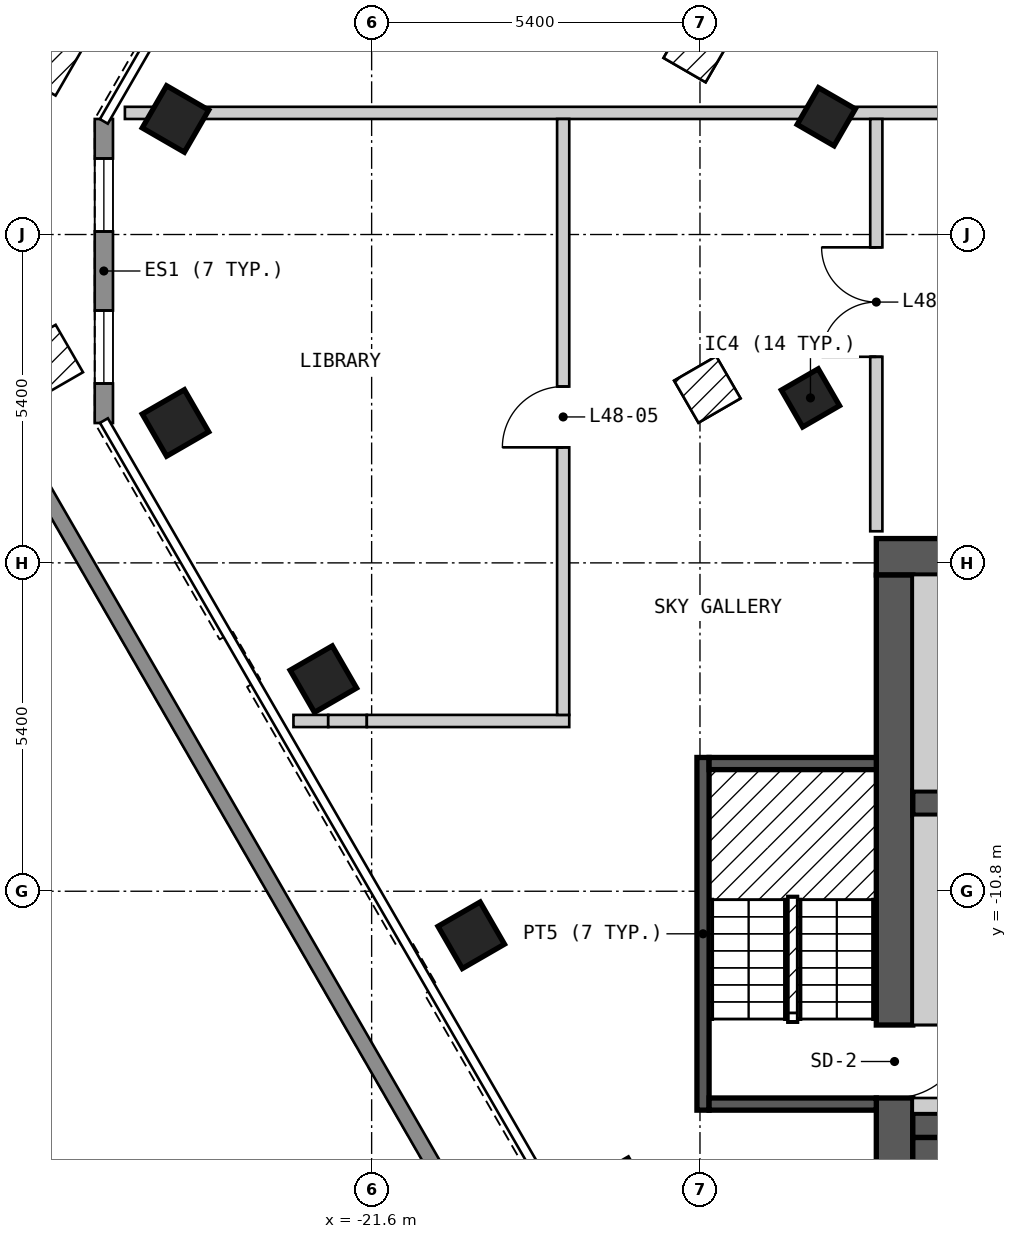
"""IFC4 building model, lengths in metres.
Left out: names, types, materials, properties, quantities, classifications, styles, units other than length and angle.
Written with IfcOpenShell. Run it as: python <this file> out.ifc"""

import sys

from ifc_helpers import new_model, si_unit, direction, frame, frame_2d, origin, origin_2d, place, context, subcontext, project, spatial, polyline, rectangle, outline, extrude, element, fill, save


model = new_model("IFC4")
c1 = context("Model", 3, precision=1e-05, world=origin(), true_north=direction((0.0, 1.0)))
c2 = subcontext(c1, "Body", "Model", "MODEL_VIEW")
j1 = project(units=[si_unit("LENGTHUNIT", "METRE"), si_unit("PLANEANGLEUNIT", "RADIAN")], contexts=[c1])
p1 = place(None, origin())
s1 = spatial("IfcSite", under=j1, at=p1, CompositionType="ELEMENT")
p2 = place(p1, origin())
s2 = spatial("IfcBuilding", under=s1, at=p2, CompositionType="ELEMENT")
p3 = place(p2, frame((0.0, 0.0, 157.2)))
s3 = spatial("IfcBuildingStorey", under=s2, at=p3, CompositionType="ELEMENT", Elevation=157.2)
for number, where, z_axis, x_axis in (
    (1, (-24.826, 1.9, 0.0), (0.0, 0.0, 1.0), (-0.5, -0.866, 0.0)),
    (2, (-24.826, -3.099, 0.0), (0.0, 0.0, 1.0), (0.5, -0.866, 0.0)),
    (3, (-22.394, -7.312, 0.0), (0.0, 0.0, 1.0), (0.5, -0.866, 0.0)),
    (4, (-19.962, -11.524, 0.0), (0.0, 0.0, 1.0), (0.5, -0.866, 0.0)),
    (5, (-17.53, -15.736, 0.0), (0.0, 0.0, 1.0), (0.5, -0.866, 0.0)),
):
    element("IfcColumn", number, at=place(p3, frame(where, z_axis=z_axis, x_axis=x_axis)), inside=s3, PredefinedType="COLUMN", context=c2, shape_type="SweptSolid", body=[
        extrude(rectangle(XDim=0.8, YDim=0.8, at=origin_2d()), origin(), (0.0, 0.0, 1.0), 6.0),
    ])
for number, where, z_axis, x_axis in (
    (6, (-14.383, -2.687, 0.0), (0.0, 0.0, 1.0), (0.5, -0.866, 0.0)),
    (7, (-14.123, 1.937, 0.0), (0.0, 0.0, 1.0), (-0.5, -0.866, 0.0)),
):
    element("IfcColumn", number, at=place(p3, frame(where, z_axis=z_axis, x_axis=x_axis)), inside=s3, PredefinedType="COLUMN", context=c2, shape_type="SweptSolid", body=[
        extrude(rectangle(XDim=0.7, YDim=0.7, at=origin_2d()), origin(), (0.0, 0.0, 1.0), 6.0),
    ])
p4 = place(p3, frame((-13.3, -5.3, 0.0), z_axis=(0.0, 0.0, 1.0), x_axis=(1.0, 0.0, 0.0)))
e8 = element("IfcWall", 8, at=p4, inside=s3, PredefinedType="SHEAR", context=c2, shape_type="SweptSolid", body=[
    extrude(rectangle(XDim=26.6, YDim=0.6, at=frame_2d((13.3, 0.0))), origin(), (0.0, 0.0, 1.0), 5.7),
])
p5 = place(p4, frame((23.65, 0.0, 0.0)))
e9 = element("IfcOpeningElement", 9, at=p5, cuts=e8, PredefinedType="OPENING", context=c2, shape_type="SweptSolid", body=[
    extrude(rectangle(XDim=1.2, YDim=2.1, at=frame_2d((0.6, 1.05))), frame((0.0, 0.31, 0.0), z_axis=(0.0, -1.0, 0.0), x_axis=(1.0, 0.0, 0.0)), (0.0, 0.0, 1.0), 0.62),
])
p6 = place(p3, frame((-13.0, -18.4, 0.0), z_axis=(0.0, 0.0, 1.0), x_axis=(0.0, 1.0, 0.0)))
e10 = element("IfcWall", 10, at=p6, inside=s3, PredefinedType="SHEAR", context=c2, shape_type="SweptSolid", body=[
    extrude(rectangle(XDim=12.8, YDim=0.6, at=frame_2d((6.4, 0.0))), origin(), (0.0, 0.0, 1.0), 5.7),
])
p7 = place(p6, frame((4.2, 0.0, 0.0)))
e11 = element("IfcOpeningElement", 11, at=p7, cuts=e10, PredefinedType="OPENING", context=c2, shape_type="SweptSolid", body=[
    extrude(rectangle(XDim=1.2, YDim=2.1, at=frame_2d((0.6, 1.05))), frame((0.0, 0.31, 0.0), z_axis=(0.0, -1.0, 0.0), x_axis=(1.0, 0.0, 0.0)), (0.0, 0.0, 1.0), 0.62),
])
p8 = place(p3, frame((-12.7, -14.65, 0.0), z_axis=(0.0, 0.0, 1.0), x_axis=(1.0, 0.0, 0.0)))
e12 = element("IfcWall", 12, at=p8, inside=s3, PredefinedType="SHEAR", context=c2, shape_type="SweptSolid", body=[
    extrude(rectangle(XDim=25.4, YDim=0.4, at=frame_2d((12.7, 0.0))), origin(), (0.0, 0.0, 1.0), 5.7),
])
p9 = place(p8, frame((1.9, 0.0, 0.0), z_axis=(0.0, 0.0, 1.0), x_axis=(-1.0, 0.0, 0.0)))
e13 = element("IfcOpeningElement", 13, at=p9, cuts=e12, PredefinedType="OPENING", context=c2, shape_type="SweptSolid", body=[
    extrude(rectangle(XDim=1.2, YDim=2.1, at=frame_2d((0.6, 1.05))), frame((0.0, 0.21, 0.0), z_axis=(0.0, -1.0, 0.0), x_axis=(1.0, 0.0, 0.0)), (0.0, 0.0, 1.0), 0.42),
])
p10 = place(p8, frame((24.75, 0.0, 0.0), z_axis=(0.0, 0.0, 1.0), x_axis=(-1.0, 0.0, 0.0)))
e14 = element("IfcOpeningElement", 14, at=p10, cuts=e12, PredefinedType="OPENING", context=c2, shape_type="SweptSolid", body=[
    extrude(rectangle(XDim=1.2, YDim=2.1, at=frame_2d((0.6, 1.05))), frame((0.0, 0.21, 0.0), z_axis=(0.0, -1.0, 0.0), x_axis=(1.0, 0.0, 0.0)), (0.0, 0.0, 1.0), 0.42),
])
p11 = place(p8, frame((8.6, 0.0, 0.0), z_axis=(0.0, 0.0, 1.0), x_axis=(-1.0, 0.0, 0.0)))
e15 = element("IfcOpeningElement", 15, at=p11, cuts=e12, PredefinedType="OPENING", context=c2, shape_type="SweptSolid", body=[
    extrude(rectangle(XDim=1.0, YDim=2.1, at=frame_2d((0.5, 1.05))), frame((0.0, 0.21, 0.0), z_axis=(0.0, -1.0, 0.0), x_axis=(1.0, 0.0, 0.0)), (0.0, 0.0, 1.0), 0.42),
])
p12 = place(p8, frame((11.35, 0.0, 0.0), z_axis=(0.0, 0.0, 1.0), x_axis=(-1.0, 0.0, 0.0)))
e16 = element("IfcOpeningElement", 16, at=p12, cuts=e12, PredefinedType="OPENING", context=c2, shape_type="SweptSolid", body=[
    extrude(rectangle(XDim=0.9, YDim=2.1, at=frame_2d((0.45, 1.05))), frame((0.0, 0.21, 0.0), z_axis=(0.0, -1.0, 0.0), x_axis=(1.0, 0.0, 0.0)), (0.0, 0.0, 1.0), 0.42),
])
p13 = place(p8, frame((14.15, 0.0, 0.0), z_axis=(0.0, 0.0, 1.0), x_axis=(-1.0, 0.0, 0.0)))
e17 = element("IfcOpeningElement", 17, at=p13, cuts=e12, PredefinedType="OPENING", context=c2, shape_type="SweptSolid", body=[
    extrude(rectangle(XDim=1.0, YDim=2.1, at=frame_2d((0.5, 1.05))), frame((0.0, 0.21, 0.0), z_axis=(0.0, -1.0, 0.0), x_axis=(1.0, 0.0, 0.0)), (0.0, 0.0, 1.0), 0.42),
])
p14 = place(p8, frame((17.75, 0.0, 0.0), z_axis=(0.0, 0.0, 1.0), x_axis=(-1.0, 0.0, 0.0)))
e18 = element("IfcOpeningElement", 18, at=p14, cuts=e12, PredefinedType="OPENING", context=c2, shape_type="SweptSolid", body=[
    extrude(rectangle(XDim=1.0, YDim=2.1, at=frame_2d((0.5, 1.05))), frame((0.0, 0.21, 0.0), z_axis=(0.0, -1.0, 0.0), x_axis=(1.0, 0.0, 0.0)), (0.0, 0.0, 1.0), 0.42),
])
p15 = place(p3, frame((-12.7, -9.35, 0.0), z_axis=(0.0, 0.0, 1.0), x_axis=(1.0, 0.0, 0.0)))
e19 = element("IfcWall", 19, at=p15, inside=s3, PredefinedType="SHEAR", context=c2, shape_type="SweptSolid", body=[
    extrude(rectangle(XDim=22.9, YDim=0.4, at=frame_2d((11.45, 0.0))), origin(), (0.0, 0.0, 1.0), 5.7),
])
p16 = place(p15, frame((1.3, 0.0, 0.0)))
e20 = element("IfcOpeningElement", 20, at=p16, cuts=e19, PredefinedType="OPENING", context=c2, shape_type="SweptSolid", body=[
    extrude(rectangle(XDim=1.1, YDim=2.1, at=frame_2d((0.55, 1.05))), frame((0.0, 0.21, 0.0), z_axis=(0.0, -1.0, 0.0), x_axis=(1.0, 0.0, 0.0)), (0.0, 0.0, 1.0), 0.42),
])
p17 = place(p15, frame((4.1, 0.0, 0.0)))
e21 = element("IfcOpeningElement", 21, at=p17, cuts=e19, PredefinedType="OPENING", context=c2, shape_type="SweptSolid", body=[
    extrude(rectangle(XDim=1.1, YDim=2.1, at=frame_2d((0.55, 1.05))), frame((0.0, 0.21, 0.0), z_axis=(0.0, -1.0, 0.0), x_axis=(1.0, 0.0, 0.0)), (0.0, 0.0, 1.0), 0.42),
])
p18 = place(p15, frame((6.9, 0.0, 0.0)))
e22 = element("IfcOpeningElement", 22, at=p18, cuts=e19, PredefinedType="OPENING", context=c2, shape_type="SweptSolid", body=[
    extrude(rectangle(XDim=1.1, YDim=2.1, at=frame_2d((0.55, 1.05))), frame((0.0, 0.21, 0.0), z_axis=(0.0, -1.0, 0.0), x_axis=(1.0, 0.0, 0.0)), (0.0, 0.0, 1.0), 0.42),
])
p19 = place(p15, frame((9.2, 0.0, 0.0)))
e23 = element("IfcOpeningElement", 23, at=p19, cuts=e19, PredefinedType="OPENING", context=c2, shape_type="SweptSolid", body=[
    extrude(rectangle(XDim=1.1, YDim=2.1, at=frame_2d((0.55, 1.05))), frame((0.0, 0.21, 0.0), z_axis=(0.0, -1.0, 0.0), x_axis=(1.0, 0.0, 0.0)), (0.0, 0.0, 1.0), 0.42),
])
p20 = place(p15, frame((11.5, 0.0, 0.0)))
e24 = element("IfcOpeningElement", 24, at=p20, cuts=e19, PredefinedType="OPENING", context=c2, shape_type="SweptSolid", body=[
    extrude(rectangle(XDim=1.1, YDim=2.1, at=frame_2d((0.55, 1.05))), frame((0.0, 0.21, 0.0), z_axis=(0.0, -1.0, 0.0), x_axis=(1.0, 0.0, 0.0)), (0.0, 0.0, 1.0), 0.42),
])
p21 = place(p15, frame((13.8, 0.0, 0.0)))
e25 = element("IfcOpeningElement", 25, at=p21, cuts=e19, PredefinedType="OPENING", context=c2, shape_type="SweptSolid", body=[
    extrude(rectangle(XDim=1.1, YDim=2.1, at=frame_2d((0.55, 1.05))), frame((0.0, 0.21, 0.0), z_axis=(0.0, -1.0, 0.0), x_axis=(1.0, 0.0, 0.0)), (0.0, 0.0, 1.0), 0.42),
])
p22 = place(p15, frame((16.1, 0.0, 0.0)))
e26 = element("IfcOpeningElement", 26, at=p22, cuts=e19, PredefinedType="OPENING", context=c2, shape_type="SweptSolid", body=[
    extrude(rectangle(XDim=1.1, YDim=2.1, at=frame_2d((0.55, 1.05))), frame((0.0, 0.21, 0.0), z_axis=(0.0, -1.0, 0.0), x_axis=(1.0, 0.0, 0.0)), (0.0, 0.0, 1.0), 0.42),
])
p23 = place(p15, frame((18.4, 0.0, 0.0)))
e27 = element("IfcOpeningElement", 27, at=p23, cuts=e19, PredefinedType="OPENING", context=c2, shape_type="SweptSolid", body=[
    extrude(rectangle(XDim=1.1, YDim=2.1, at=frame_2d((0.55, 1.05))), frame((0.0, 0.21, 0.0), z_axis=(0.0, -1.0, 0.0), x_axis=(1.0, 0.0, 0.0)), (0.0, 0.0, 1.0), 0.42),
])
p24 = place(p15, frame((20.8, 0.0, 0.0)))
e28 = element("IfcOpeningElement", 28, at=p24, cuts=e19, PredefinedType="OPENING", context=c2, shape_type="SweptSolid", body=[
    extrude(rectangle(XDim=1.1, YDim=2.1, at=frame_2d((0.55, 1.05))), frame((0.0, 0.21, 0.0), z_axis=(0.0, -1.0, 0.0), x_axis=(1.0, 0.0, 0.0)), (0.0, 0.0, 1.0), 0.42),
])
p25 = place(p3, frame((-26.004, 1.9, 0.0), z_axis=(0.0, 0.0, 1.0), x_axis=(0.0, -1.0, 0.0)))
e29 = element("IfcWall", 29, at=p25, inside=s3, PredefinedType="SOLIDWALL", context=c2, shape_type="SweptSolid", body=[
    extrude(outline(polyline([(0.0, -0.15), (5.0, -0.15), (4.92, 0.15), (0.08, 0.15), (0.0, -0.15)])), origin(), (0.0, 0.0, 1.0), 5.7),
])
p26 = place(p25, frame((0.65, 0.0, 0.15)))
e30 = element("IfcOpeningElement", 30, at=p26, cuts=e29, PredefinedType="OPENING", context=c2, shape_type="SweptSolid", body=[
    extrude(rectangle(XDim=1.2, YDim=2.1, at=frame_2d((0.6, 1.05))), frame((0.0, 0.16, 0.0), z_axis=(0.0, -1.0, 0.0), x_axis=(1.0, 0.0, 0.0)), (0.0, 0.0, 1.0), 0.32),
])
p27 = place(p25, frame((3.15, 0.0, 0.15)))
e31 = element("IfcOpeningElement", 31, at=p27, cuts=e29, PredefinedType="OPENING", context=c2, shape_type="SweptSolid", body=[
    extrude(rectangle(XDim=1.2, YDim=2.1, at=frame_2d((0.6, 1.05))), frame((0.0, 0.16, 0.0), z_axis=(0.0, -1.0, 0.0), x_axis=(1.0, 0.0, 0.0)), (0.0, 0.0, 1.0), 0.32),
])
p28 = place(p3, frame((-15.883, -23.437, 0.0), z_axis=(0.0, 0.0, 1.0), x_axis=(-0.500068533128, 0.865985832549, 0.0)))
e32 = element("IfcWall", 32, at=p28, inside=s3, PredefinedType="PARAPET", context=c2, shape_type="SweptSolid", body=[
    extrude(outline(polyline([(0.067, -0.125), (24.644, -0.125), (24.71, 0.125), (0.0, 0.125), (0.067, -0.125)])), origin(), (0.0, 0.0, 1.0), 1.6),
])
p29 = place(p3, frame((-28.24, 2.838, 0.0), z_axis=(0.0, 0.0, 1.0), x_axis=(0.500065532695, 0.865987565159, 0.0)))
e33 = element("IfcWall", 33, at=p29, inside=s3, PredefinedType="PARAPET", context=c2, shape_type="SweptSolid", body=[
    extrude(outline(polyline([(0.067, -0.125), (23.258, -0.125), (23.325, 0.125), (0.0, 0.125), (0.067, -0.125)])), origin(), (0.0, 0.0, 1.0), 1.6),
])
p30 = place(p3, frame((-22.886, -8.0, 0.0), z_axis=(0.0, 0.0, 1.0), x_axis=(1.0, 0.0, 0.0)))
e34 = element("IfcWall", 34, at=p30, inside=s3, PredefinedType="PARTITIONING", context=c2, shape_type="SweptSolid", body=[
    extrude(rectangle(XDim=0.572, YDim=0.2, at=frame_2d((0.286, 0.0))), origin(), (0.0, 0.0, 1.0), 5.7),
])
p31 = place(p3, frame((-22.314, -8.0, 0.0), z_axis=(0.0, 0.0, 1.0), x_axis=(1.0, 0.0, 0.0)))
e35 = element("IfcWall", 35, at=p31, inside=s3, PredefinedType="PARTITIONING", context=c2, shape_type="SweptSolid", body=[
    extrude(rectangle(XDim=0.635, YDim=0.2, at=frame_2d((0.317, 0.0))), origin(), (0.0, 0.0, 1.0), 5.12),
])
p32 = place(p3, frame((-21.679, -8.0, 0.0), z_axis=(0.0, 0.0, 1.0), x_axis=(1.0, 0.0, 0.0)))
e36 = element("IfcWall", 36, at=p32, inside=s3, PredefinedType="PARTITIONING", context=c2, shape_type="SweptSolid", body=[
    extrude(rectangle(XDim=3.329, YDim=0.2, at=frame_2d((1.665, 0.0))), origin(), (0.0, 0.0, 1.0), 5.7),
])
p33 = place(p3, frame((-25.658, 2.0, 0.0), z_axis=(0.0, 0.0, 1.0), x_axis=(1.0, 0.0, 0.0)))
e37 = element("IfcWall", 37, at=p33, inside=s3, PredefinedType="PARTITIONING", context=c2, shape_type="SweptSolid", body=[
    extrude(rectangle(XDim=0.637, YDim=0.2, at=frame_2d((0.318, 0.0))), origin(), (0.0, 0.0, 1.0), 5.7),
])
p34 = place(p3, frame((-25.021, 2.0, 0.0), z_axis=(0.0, 0.0, 1.0), x_axis=(1.0, 0.0, 0.0)))
e38 = element("IfcWall", 38, at=p34, inside=s3, PredefinedType="PARTITIONING", context=c2, shape_type="SweptSolid", body=[
    extrude(rectangle(XDim=0.57, YDim=0.2, at=frame_2d((0.285, 0.0))), origin(), (0.0, 0.0, 1.0), 5.12),
])
p35 = place(p3, frame((-24.451, 2.0, 0.0), z_axis=(0.0, 0.0, 1.0), x_axis=(1.0, 0.0, 0.0)))
e39 = element("IfcWall", 39, at=p35, inside=s3, PredefinedType="PARTITIONING", context=c2, shape_type="SweptSolid", body=[
    extrude(rectangle(XDim=37.451, YDim=0.2, at=frame_2d((18.726, 0.0))), origin(), (0.0, 0.0, 1.0), 5.7),
])
p36 = place(p35, frame((32.887, 0.0, 0.0)))
e40 = element("IfcOpeningElement", 40, at=p36, cuts=e39, PredefinedType="OPENING", context=c2, shape_type="SweptSolid", body=[
    extrude(rectangle(XDim=1.8, YDim=2.1, at=frame_2d((0.9, 1.05))), frame((0.0, 0.11, 0.0), z_axis=(0.0, -1.0, 0.0), x_axis=(1.0, 0.0, 0.0)), (0.0, 0.0, 1.0), 0.22),
])
p37 = place(p35, frame((23.551, 0.0, 0.0)))
e41 = element("IfcOpeningElement", 41, at=p37, cuts=e39, PredefinedType="OPENING", context=c2, shape_type="SweptSolid", body=[
    extrude(rectangle(XDim=1.8, YDim=2.1, at=frame_2d((0.9, 1.05))), frame((0.0, 0.11, 0.0), z_axis=(0.0, -1.0, 0.0), x_axis=(1.0, 0.0, 0.0)), (0.0, 0.0, 1.0), 0.22),
])
p38 = place(p35, frame((15.553, 0.0, 0.0)))
e42 = element("IfcOpeningElement", 42, at=p38, cuts=e39, PredefinedType="OPENING", context=c2, shape_type="SweptSolid", body=[
    extrude(rectangle(XDim=1.8, YDim=2.1, at=frame_2d((0.9, 1.05))), frame((0.0, 0.11, 0.0), z_axis=(0.0, -1.0, 0.0), x_axis=(1.0, 0.0, 0.0)), (0.0, 0.0, 1.0), 0.22),
])
p39 = place(p3, frame((-18.45, -7.9, 0.0), z_axis=(0.0, 0.0, 1.0), x_axis=(0.0, 1.0, 0.0)))
e43 = element("IfcWall", 43, at=p39, inside=s3, PredefinedType="PARTITIONING", context=c2, shape_type="SweptSolid", body=[
    extrude(rectangle(XDim=9.8, YDim=0.2, at=frame_2d((4.9, 0.0))), origin(), (0.0, 0.0, 1.0), 5.7),
])
p40 = place(p39, frame((4.4, 0.0, 0.0)))
e44 = element("IfcOpeningElement", 44, at=p40, cuts=e43, PredefinedType="OPENING", context=c2, shape_type="SweptSolid", body=[
    extrude(rectangle(XDim=1.0, YDim=2.1, at=frame_2d((0.5, 1.05))), frame((0.0, 0.11, 0.0), z_axis=(0.0, -1.0, 0.0), x_axis=(1.0, 0.0, 0.0)), (0.0, 0.0, 1.0), 0.22),
])
p41 = place(p3, frame((-13.3, -4.88, 0.0), z_axis=(0.0, 0.0, 1.0), x_axis=(0.0, 1.0, 0.0)))
e45 = element("IfcWall", 45, at=p41, inside=s3, PredefinedType="PARTITIONING", context=c2, shape_type="SweptSolid", body=[
    extrude(rectangle(XDim=6.78, YDim=0.2, at=frame_2d((3.39, 0.0))), origin(), (0.0, 0.0, 1.0), 5.7),
])
p42 = place(p41, frame((2.869, 0.0, 0.0)))
e46 = element("IfcOpeningElement", 46, at=p42, cuts=e45, PredefinedType="OPENING", context=c2, shape_type="SweptSolid", body=[
    extrude(rectangle(XDim=1.8, YDim=2.1, at=frame_2d((0.9, 1.05))), frame((0.0, 0.11, 0.0), z_axis=(0.0, -1.0, 0.0), x_axis=(1.0, 0.0, 0.0)), (0.0, 0.0, 1.0), 0.22),
])
p43 = place(p3, frame((-16.15, -14.4, 0.0), z_axis=(0.0, 0.0, 1.0), x_axis=(0.0, 1.0, 0.0)))
e47 = element("IfcWall", 47, at=p43, inside=s3, PredefinedType="SOLIDWALL", context=c2, shape_type="SweptSolid", body=[
    extrude(rectangle(XDim=5.8, YDim=0.2, at=frame_2d((2.9, 0.0))), origin(), (0.0, 0.0, 1.0), 5.7),
])
for number, where, z_axis, x_axis in (
    (48, (-16.05, -14.3, 0.0), (0.0, 0.0, 1.0), (1.0, 0.0, 0.0)),
    (49, (-16.05, -8.7, 0.0), (0.0, 0.0, 1.0), (1.0, 0.0, 0.0)),
):
    element("IfcWall", number, at=place(p3, frame(where, z_axis=z_axis, x_axis=x_axis)), inside=s3, PredefinedType="SOLIDWALL", context=c2, shape_type="SweptSolid", body=[
        extrude(rectangle(XDim=2.75, YDim=0.2, at=frame_2d((1.375, 0.0))), origin(), (0.0, 0.0, 1.0), 5.7),
    ])
p44 = place(p3, frame((-12.4, -18.4, 0.0), z_axis=(0.0, 0.0, 1.0), x_axis=(0.0, 1.0, 0.0)))
e50 = element("IfcWall", 50, at=p44, inside=s3, PredefinedType="SOLIDWALL", context=c2, shape_type="SweptSolid", body=[
    extrude(rectangle(XDim=3.55, YDim=0.6, at=frame_2d((1.775, 0.0))), origin(), (0.0, 0.0, 1.0), 5.7),
])
p45 = place(p3, frame((-12.7, -14.325, 0.0), z_axis=(0.0, 0.0, 1.0), x_axis=(1.0, 0.0, 0.0)))
e51 = element("IfcWall", 51, at=p45, inside=s3, PredefinedType="PARTITIONING", context=c2, shape_type="SweptSolid", body=[
    extrude(rectangle(XDim=0.6, YDim=0.25, at=frame_2d((0.3, 0.0))), origin(), (0.0, 0.0, 1.0), 5.7),
])
p46 = place(p3, frame((-12.4, -13.0, 0.0), z_axis=(0.0, 0.0, 1.0), x_axis=(0.0, 1.0, 0.0)))
e52 = element("IfcWall", 52, at=p46, inside=s3, PredefinedType="PARTITIONING", context=c2, shape_type="SweptSolid", body=[
    extrude(rectangle(XDim=3.45, YDim=0.6, at=frame_2d((1.725, 0.0))), origin(), (0.0, 0.0, 1.0), 5.7),
])
p47 = place(p3, frame((-12.4, -9.15, 0.0), z_axis=(0.0, 0.0, 1.0), x_axis=(0.0, 1.0, 0.0)))
e53 = element("IfcWall", 53, at=p47, inside=s3, PredefinedType="SOLIDWALL", context=c2, shape_type="SweptSolid", body=[
    extrude(rectangle(XDim=3.55, YDim=0.6, at=frame_2d((1.775, 0.0))), origin(), (0.0, 0.0, 1.0), 5.7),
])
p48 = place(p26, origin())
e54 = element("IfcWindow", 54, at=p48, inside=s3, PartitioningType="SINGLE_PANEL", PredefinedType="WINDOW", context=c2, shape_type="SweptSolid", body=[
    extrude(rectangle(XDim=1.2, YDim=2.1, at=frame_2d((0.6, 1.05))), frame((0.0, 0.03, 0.0), z_axis=(0.0, -1.0, 0.0), x_axis=(1.0, 0.0, 0.0)), (0.0, 0.0, 1.0), 0.06),
])
fill(e30, e54)
p49 = place(p27, origin())
e55 = element("IfcWindow", 55, at=p49, inside=s3, PartitioningType="SINGLE_PANEL", PredefinedType="WINDOW", context=c2, shape_type="SweptSolid", body=[
    extrude(rectangle(XDim=1.2, YDim=2.1, at=frame_2d((0.6, 1.05))), frame((0.0, 0.03, 0.0), z_axis=(0.0, -1.0, 0.0), x_axis=(1.0, 0.0, 0.0)), (0.0, 0.0, 1.0), 0.06),
])
fill(e31, e55)
p50 = place(p40, origin())
e56 = element("IfcDoor", 56, at=p50, inside=s3, OperationType="SINGLE_SWING_LEFT", PredefinedType="DOOR", context=c2, shape_type="SweptSolid", body=[
    extrude(rectangle(XDim=1.0, YDim=2.1, at=frame_2d((0.5, 1.05))), frame((0.0, 0.025, 0.0), z_axis=(0.0, -1.0, 0.0), x_axis=(1.0, 0.0, 0.0)), (0.0, 0.0, 1.0), 0.05),
])
fill(e44, e56)
p51 = place(p42, origin())
e57 = element("IfcDoor", 57, at=p51, inside=s3, OperationType="DOUBLE_DOOR_SINGLE_SWING", PredefinedType="DOOR", context=c2, shape_type="SweptSolid", body=[
    extrude(rectangle(XDim=1.8, YDim=2.1, at=frame_2d((0.9, 1.05))), frame((0.0, 0.025, 0.0), z_axis=(0.0, -1.0, 0.0), x_axis=(1.0, 0.0, 0.0)), (0.0, 0.0, 1.0), 0.05),
])
fill(e46, e57)
p52 = place(p7, origin())
e58 = element("IfcDoor", 58, at=p52, inside=s3, OperationType="SINGLE_SWING_RIGHT", PredefinedType="DOOR", context=c2, shape_type="SweptSolid", body=[
    extrude(rectangle(XDim=1.2, YDim=2.1, at=frame_2d((0.6, 1.05))), frame((0.0, 0.025, 0.0), z_axis=(0.0, -1.0, 0.0), x_axis=(1.0, 0.0, 0.0)), (0.0, 0.0, 1.0), 0.05),
])
fill(e11, e58)
save(model, sys.argv[1])
